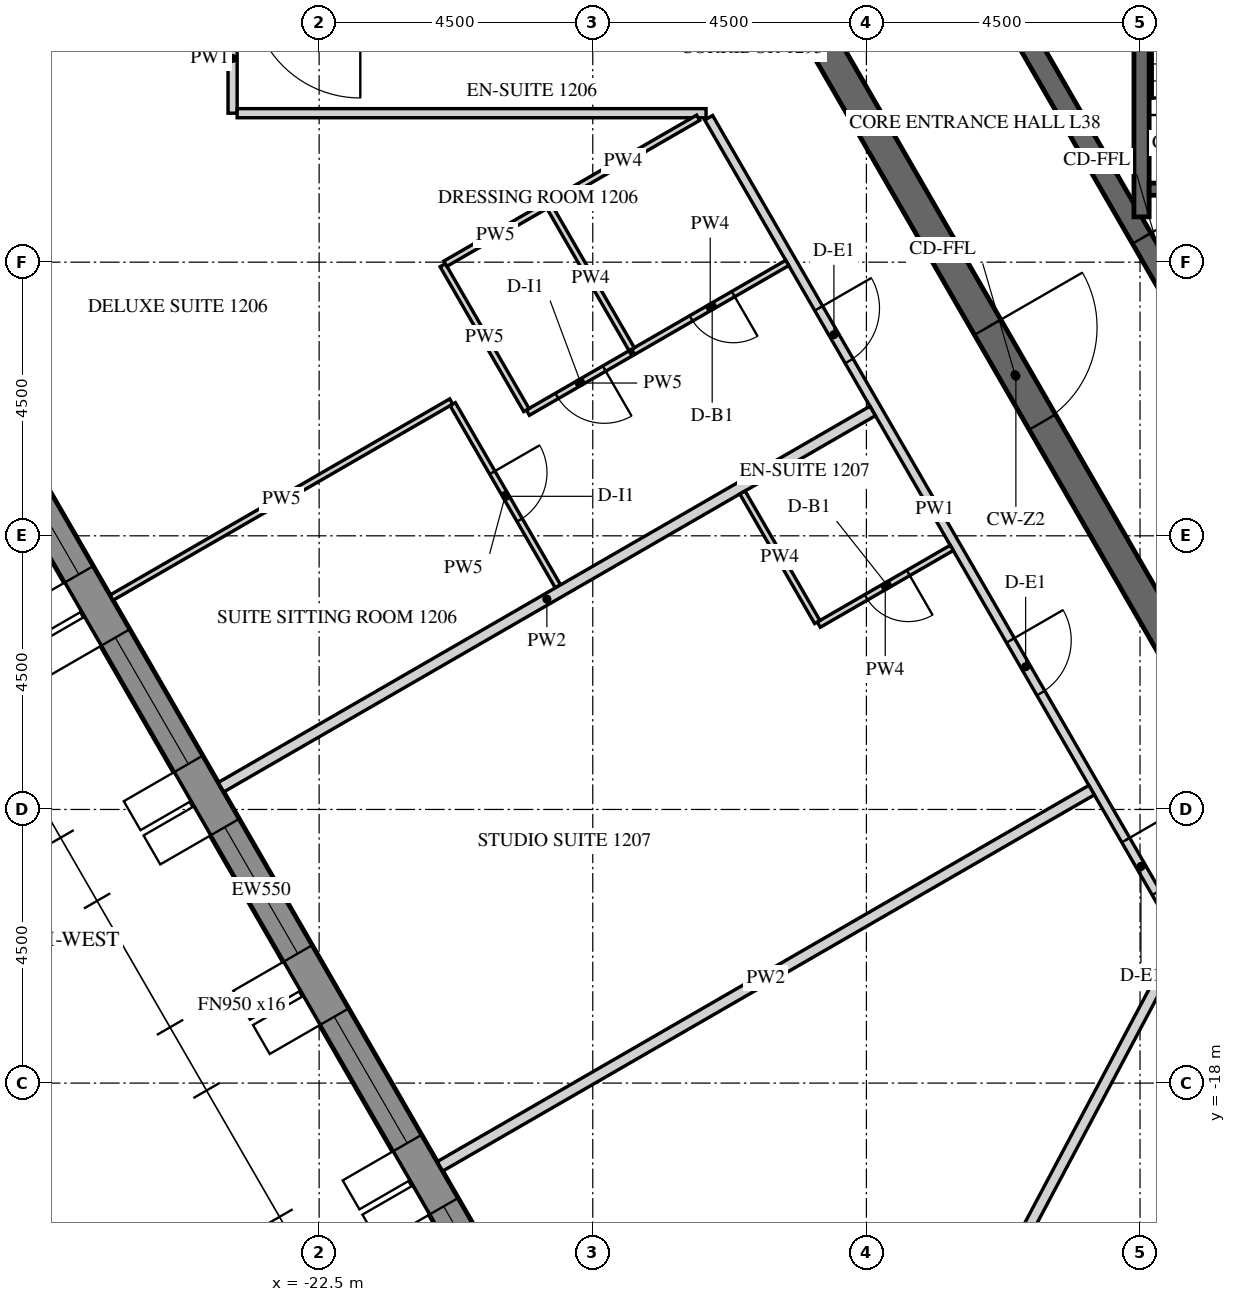
"""IFC4 building model, lengths in metres.
Left out: names, types, materials, properties, quantities, classifications, styles, units other than length and angle.
Written with IfcOpenShell. Run it as: python <this file> out.ifc"""

import sys

from ifc_helpers import new_model, si_unit, direction, frame, frame_2d, origin, place, context, subcontext, project, spatial, polyline, rectangle, outline, extrude, element, fill, save


model = new_model("IFC4")
c1 = context("Model", 3, precision=1e-05, world=origin(), true_north=direction((0.0, 1.0)))
c2 = subcontext(c1, "Body", "Model", "MODEL_VIEW")
j1 = project(units=[si_unit("LENGTHUNIT", "METRE"), si_unit("PLANEANGLEUNIT", "RADIAN")], contexts=[c1])
p1 = place(None, origin())
s1 = spatial("IfcSite", under=j1, at=p1, CompositionType="ELEMENT")
p2 = place(p1, origin())
s2 = spatial("IfcBuilding", under=s1, at=p2, CompositionType="ELEMENT")
p3 = place(p2, frame((0.0, 0.0, 164.4)))
s3 = spatial("IfcBuildingStorey", under=s2, at=p3, CompositionType="ELEMENT", Elevation=164.4)
p4 = place(p3, frame((-30.391, -2.811, -0.15), z_axis=(0.0, 0.0, 1.0), x_axis=(0.499998569178, -0.866026229868, 0.0)))
e1 = element("IfcWall", 1, at=p4, inside=s3, PredefinedType="SOLIDWALL", context=c2, shape_type="SweptSolid", body=[
    extrude(outline(polyline([(-0.022, -0.275), (27.783, -0.275), (27.732, 0.275), (0.022, 0.275), (-0.022, -0.275)])), origin(), (0.0, 0.0, 1.0), 3.9),
])
p5 = place(p4, frame((1.879, 0.0, 1.05)))
e2 = element("IfcOpeningElement", 2, at=p5, cuts=e1, PredefinedType="OPENING", context=c2, shape_type="SweptSolid", body=[
    extrude(rectangle(XDim=2.4, YDim=2.4, at=frame_2d((1.2, 1.2))), frame((0.0, 0.285, 0.0), z_axis=(0.0, -1.0, 0.0), x_axis=(1.0, 0.0, 0.0)), (0.0, 0.0, 1.0), 0.57),
])
p6 = place(p4, frame((5.479, 0.0, 1.05)))
e3 = element("IfcOpeningElement", 3, at=p6, cuts=e1, PredefinedType="OPENING", context=c2, shape_type="SweptSolid", body=[
    extrude(rectangle(XDim=2.4, YDim=2.4, at=frame_2d((1.2, 1.2))), frame((0.0, 0.285, 0.0), z_axis=(0.0, -1.0, 0.0), x_axis=(1.0, 0.0, 0.0)), (0.0, 0.0, 1.0), 0.57),
])
p7 = place(p4, frame((9.079, 0.0, 1.05)))
e4 = element("IfcOpeningElement", 4, at=p7, cuts=e1, PredefinedType="OPENING", context=c2, shape_type="SweptSolid", body=[
    extrude(rectangle(XDim=2.4, YDim=2.4, at=frame_2d((1.2, 1.2))), frame((0.0, 0.285, 0.0), z_axis=(0.0, -1.0, 0.0), x_axis=(1.0, 0.0, 0.0)), (0.0, 0.0, 1.0), 0.57),
])
p8 = place(p4, frame((12.679, 0.0, 1.05)))
e5 = element("IfcOpeningElement", 5, at=p8, cuts=e1, PredefinedType="OPENING", context=c2, shape_type="SweptSolid", body=[
    extrude(rectangle(XDim=2.4, YDim=2.4, at=frame_2d((1.2, 1.2))), frame((0.0, 0.285, 0.0), z_axis=(0.0, -1.0, 0.0), x_axis=(1.0, 0.0, 0.0)), (0.0, 0.0, 1.0), 0.57),
])
p9 = place(p4, frame((16.279, 0.0, 1.05)))
e6 = element("IfcOpeningElement", 6, at=p9, cuts=e1, PredefinedType="OPENING", context=c2, shape_type="SweptSolid", body=[
    extrude(rectangle(XDim=2.4, YDim=2.4, at=frame_2d((1.2, 1.2))), frame((0.0, 0.285, 0.0), z_axis=(0.0, -1.0, 0.0), x_axis=(1.0, 0.0, 0.0)), (0.0, 0.0, 1.0), 0.57),
])
p10 = place(p4, frame((19.879, 0.0, 1.05)))
e7 = element("IfcOpeningElement", 7, at=p10, cuts=e1, PredefinedType="OPENING", context=c2, shape_type="SweptSolid", body=[
    extrude(rectangle(XDim=2.4, YDim=2.4, at=frame_2d((1.2, 1.2))), frame((0.0, 0.285, 0.0), z_axis=(0.0, -1.0, 0.0), x_axis=(1.0, 0.0, 0.0)), (0.0, 0.0, 1.0), 0.57),
])
p11 = place(p4, frame((23.479, 0.0, 1.05)))
e8 = element("IfcOpeningElement", 8, at=p11, cuts=e1, PredefinedType="OPENING", context=c2, shape_type="SweptSolid", body=[
    extrude(rectangle(XDim=2.4, YDim=2.4, at=frame_2d((1.2, 1.2))), frame((0.0, 0.285, 0.0), z_axis=(0.0, -1.0, 0.0), x_axis=(1.0, 0.0, 0.0)), (0.0, 0.0, 1.0), 0.57),
])
p12 = place(p3, frame((-14.722, 0.0, -0.15), z_axis=(0.0, 0.0, 1.0), x_axis=(0.50000571537, -0.866022103989, 0.0)))
e9 = element("IfcWall", 9, at=p12, inside=s3, PredefinedType="SHEAR", context=c2, shape_type="SweptSolid", body=[
    extrude(outline(polyline([(-0.144, -0.25), (14.867, -0.25), (14.578, 0.25), (0.144, 0.25), (-0.144, -0.25)])), origin(), (0.0, 0.0, 1.0), 3.9),
])
p13 = place(p12, frame((6.432, 0.0, 0.15)))
e10 = element("IfcOpeningElement", 10, at=p13, cuts=e9, PredefinedType="OPENING", context=c2, shape_type="SweptSolid", body=[
    extrude(rectangle(XDim=1.8, YDim=2.4, at=frame_2d((0.9, 1.2))), frame((0.0, 0.26, 0.0), z_axis=(0.0, -1.0, 0.0), x_axis=(1.0, 0.0, 0.0)), (0.0, 0.0, 1.0), 0.52),
])
p14 = place(p3, frame((-11.345, 0.0, -0.15), z_axis=(0.0, 0.0, 1.0), x_axis=(0.499995046907, -0.866028263435, 0.0)))
e11 = element("IfcWall", 11, at=p14, inside=s3, PredefinedType="SHEAR", context=c2, shape_type="SweptSolid", body=[
    extrude(outline(polyline([(-0.101, -0.175), (11.446, -0.175), (11.244, 0.175), (0.101, 0.175), (-0.101, -0.175)])), origin(), (0.0, 0.0, 1.0), 3.9),
])
p15 = place(p14, frame((4.744, 0.0, 0.15)))
e12 = element("IfcOpeningElement", 12, at=p15, cuts=e11, PredefinedType="OPENING", context=c2, shape_type="SweptSolid", body=[
    extrude(rectangle(XDim=1.8, YDim=2.4, at=frame_2d((0.9, 1.2))), frame((0.0, 0.185, 0.0), z_axis=(0.0, -1.0, 0.0), x_axis=(1.0, 0.0, 0.0)), (0.0, 0.0, 1.0), 0.37),
])
p16 = place(p3, frame((-8.975, -3.755, -0.25), z_axis=(0.0, 0.0, 1.0), x_axis=(0.0, 1.0, 0.0)))
e13 = element("IfcWall", 13, at=p16, inside=s3, PredefinedType="SHEAR", context=c2, shape_type="SweptSolid", body=[
    extrude(rectangle(XDim=7.51, YDim=0.25, at=frame_2d((3.755, 0.0))), origin(), (0.0, 0.0, 1.0), 3.9),
])
p17 = place(p3, frame((-8.85, -3.3, -0.25), z_axis=(0.0, 0.0, 1.0), x_axis=(1.0, 0.0, 0.0)))
e14 = element("IfcWall", 14, at=p17, inside=s3, PredefinedType="SHEAR", context=c2, shape_type="SweptSolid", body=[
    extrude(rectangle(XDim=2.95, YDim=0.2, at=frame_2d((1.475, 0.0))), origin(), (0.0, 0.0, 1.0), 3.9),
])
p18 = place(p17, frame((0.875, 0.0, 0.25)))
e15 = element("IfcOpeningElement", 15, at=p18, cuts=e14, PredefinedType="OPENING", context=c2, shape_type="SweptSolid", body=[
    extrude(rectangle(XDim=1.2, YDim=2.4, at=frame_2d((0.6, 1.2))), frame((0.0, 0.11, 0.0), z_axis=(0.0, -1.0, 0.0), x_axis=(1.0, 0.0, 0.0)), (0.0, 0.0, 1.0), 0.22),
])
p19 = place(p3, frame((-23.923, -0.25, 0.0), z_axis=(0.0, 0.0, 1.0), x_axis=(0.0, -1.0, 0.0)))
e16 = element("IfcWall", 16, at=p19, inside=s3, PredefinedType="PARTITIONING", context=c2, shape_type="SweptSolid", body=[
    extrude(rectangle(XDim=1.8, YDim=0.15, at=frame_2d((0.9, 0.0))), origin(), (0.0, 0.0, 1.0), 2.988),
])
p20 = place(p3, frame((-23.848, -2.05, 0.0), z_axis=(0.0, 0.0, 1.0), x_axis=(1.0, 0.0, 0.0)))
e17 = element("IfcWall", 17, at=p20, inside=s3, PredefinedType="PARTITIONING", context=c2, shape_type="SweptSolid", body=[
    extrude(rectangle(XDim=7.711, YDim=0.15, at=frame_2d((3.855, 0.0))), origin(), (0.0, 0.0, 1.0), 2.988),
])
p21 = place(p3, frame((-16.094, -2.125, 0.0), z_axis=(0.0, 0.0, 1.0), x_axis=(0.500010545262, -0.866019315389, 0.0)))
e18 = element("IfcWall", 18, at=p21, inside=s3, PredefinedType="PARTITIONING", context=c2, shape_type="SweptSolid", body=[
    extrude(rectangle(XDim=14.867, YDim=0.15, at=frame_2d((7.434, 0.0))), origin(), (0.0, 0.0, 1.0), 2.988),
])
p22 = place(p21, frame((3.619, 0.0, 0.0)))
e19 = element("IfcOpeningElement", 19, at=p22, cuts=e18, PredefinedType="OPENING", context=c2, shape_type="SweptSolid", body=[
    extrude(rectangle(XDim=1.0, YDim=2.1, at=frame_2d((0.5, 1.05))), frame((0.0, 0.085, 0.0), z_axis=(0.0, -1.0, 0.0), x_axis=(1.0, 0.0, 0.0)), (0.0, 0.0, 1.0), 0.17),
])
p23 = place(p21, frame((9.924, 0.0, 0.0)))
e20 = element("IfcOpeningElement", 20, at=p23, cuts=e18, PredefinedType="OPENING", context=c2, shape_type="SweptSolid", body=[
    extrude(rectangle(XDim=1.0, YDim=2.1, at=frame_2d((0.5, 1.05))), frame((0.0, 0.085, 0.0), z_axis=(0.0, -1.0, 0.0), x_axis=(1.0, 0.0, 0.0)), (0.0, 0.0, 1.0), 0.17),
])
p24 = place(p21, frame((13.717, 0.0, 0.0)))
e21 = element("IfcOpeningElement", 21, at=p24, cuts=e18, PredefinedType="OPENING", context=c2, shape_type="SweptSolid", body=[
    extrude(rectangle(XDim=1.0, YDim=2.1, at=frame_2d((0.5, 1.05))), frame((0.0, 0.085, 0.0), z_axis=(0.0, -1.0, 0.0), x_axis=(1.0, 0.0, 0.0)), (0.0, 0.0, 1.0), 0.17),
])
p25 = place(p3, frame((-18.735, -3.55, 0.0), z_axis=(0.0, 0.0, 1.0), x_axis=(0.866025820012, 0.499999279071, 0.0)))
e22 = element("IfcWall", 22, at=p25, inside=s3, PredefinedType="PARTITIONING", context=c2, shape_type="SweptSolid", body=[
    extrude(rectangle(XDim=2.85, YDim=0.1, at=frame_2d((1.425, 0.0))), origin(), (0.0, 0.0, 1.0), 2.988),
])
p26 = place(p3, frame((-14.802, -4.512, 0.0), z_axis=(0.0, 0.0, 1.0), x_axis=(-0.866025730634, -0.499999433879, 0.0)))
e23 = element("IfcWall", 23, at=p26, inside=s3, PredefinedType="PARTITIONING", context=c2, shape_type="SweptSolid", body=[
    extrude(rectangle(XDim=2.925, YDim=0.1, at=frame_2d((1.462, 0.0))), origin(), (0.0, 0.0, 1.0), 2.988),
])
p27 = place(p26, frame((1.025, 0.0, 0.0)))
e24 = element("IfcOpeningElement", 24, at=p27, cuts=e23, PredefinedType="OPENING", context=c2, shape_type="SweptSolid", body=[
    extrude(rectangle(XDim=0.8, YDim=2.1, at=frame_2d((0.4, 1.05))), frame((0.0, 0.06, 0.0), z_axis=(0.0, -1.0, 0.0), x_axis=(1.0, 0.0, 0.0)), (0.0, 0.0, 1.0), 0.12),
])
p28 = place(p3, frame((-17.378, -6.0, 0.0), z_axis=(0.0, 0.0, 1.0), x_axis=(-0.866000020948, -0.500043961785, 0.0)))
e25 = element("IfcWall", 25, at=p28, inside=s3, PredefinedType="PARTITIONING", context=c2, shape_type="SweptSolid", body=[
    extrude(rectangle(XDim=1.95, YDim=0.1, at=frame_2d((0.975, 0.0))), origin(), (0.0, 0.0, 1.0), 2.988),
])
p29 = place(p28, frame((0.5, 0.0, 0.0)))
e26 = element("IfcOpeningElement", 26, at=p29, cuts=e25, PredefinedType="OPENING", context=c2, shape_type="SweptSolid", body=[
    extrude(rectangle(XDim=0.9, YDim=2.1, at=frame_2d((0.45, 1.05))), frame((0.0, 0.06, 0.0), z_axis=(0.0, -1.0, 0.0), x_axis=(1.0, 0.0, 0.0)), (0.0, 0.0, 1.0), 0.12),
])
p30 = place(p3, frame((-19.092, -6.932, 0.0), z_axis=(0.0, 0.0, 1.0), x_axis=(-0.499996545922, 0.866027397988, 0.0)))
e27 = element("IfcWall", 27, at=p30, inside=s3, PredefinedType="PARTITIONING", context=c2, shape_type="SweptSolid", body=[
    extrude(rectangle(XDim=2.75, YDim=0.1, at=frame_2d((1.375, 0.0))), origin(), (0.0, 0.0, 1.0), 2.988),
])
p31 = place(p3, frame((-20.424, -4.525, 0.0), z_axis=(0.0, 0.0, 1.0), x_axis=(0.866044365799, 0.499967155389, 0.0)))
e28 = element("IfcWall", 28, at=p31, inside=s3, PredefinedType="PARTITIONING", context=c2, shape_type="SweptSolid", body=[
    extrude(rectangle(XDim=1.9, YDim=0.1, at=frame_2d((0.95, 0.0))), origin(), (0.0, 0.0, 1.0), 2.988),
])
p32 = place(p3, frame((-25.914, -10.017, 0.0), z_axis=(0.0, 0.0, 1.0), x_axis=(0.866021702275, 0.500006411147, 0.0)))
e29 = element("IfcWall", 29, at=p32, inside=s3, PredefinedType="PARTITIONING", context=c2, shape_type="SweptSolid", body=[
    extrude(rectangle(XDim=6.45, YDim=0.1, at=frame_2d((3.225, 0.0))), origin(), (0.0, 0.0, 1.0), 2.988),
])
p33 = place(p3, frame((-20.302, -6.835, 0.0), z_axis=(0.0, 0.0, 1.0), x_axis=(0.500009533716, -0.866019899421, 0.0)))
e30 = element("IfcWall", 30, at=p33, inside=s3, PredefinedType="PARTITIONING", context=c2, shape_type="SweptSolid", body=[
    extrude(rectangle(XDim=3.46, YDim=0.1, at=frame_2d((1.73, 0.0))), origin(), (0.0, 0.0, 1.0), 2.988),
])
p34 = place(p33, frame((1.3, 0.0, 0.0)))
e31 = element("IfcOpeningElement", 31, at=p34, cuts=e30, PredefinedType="OPENING", context=c2, shape_type="SweptSolid", body=[
    extrude(rectangle(XDim=0.9, YDim=2.1, at=frame_2d((0.45, 1.05))), frame((0.0, 0.06, 0.0), z_axis=(0.0, -1.0, 0.0), x_axis=(1.0, 0.0, 0.0)), (0.0, 0.0, 1.0), 0.12),
])
p35 = place(p3, frame((-24.114, -13.134, 0.0), z_axis=(0.0, 0.0, 1.0), x_axis=(0.866024931941, 0.500000817256, 0.0)))
e32 = element("IfcWall", 32, at=p35, inside=s3, PredefinedType="PARTITIONING", context=c2, shape_type="SweptSolid", body=[
    extrude(rectangle(XDim=12.375, YDim=0.18, at=frame_2d((6.188, 0.0))), origin(), (0.0, 0.0, 1.0), 2.988),
])
p36 = place(p3, frame((-18.71, -3.593, 0.0), z_axis=(0.0, 0.0, 1.0), x_axis=(0.4999416173, -0.866059108428, 0.0)))
e33 = element("IfcWall", 33, at=p36, inside=s3, PredefinedType="PARTITIONING", context=c2, shape_type="SweptSolid", body=[
    extrude(rectangle(XDim=2.7, YDim=0.1, at=frame_2d((1.35, 0.0))), origin(), (0.0, 0.0, 1.0), 2.988),
])
p37 = place(p3, frame((-12.096, -9.198, 0.0), z_axis=(0.0, 0.0, 1.0), x_axis=(-0.866039067339, -0.499976333282, 0.0)))
e34 = element("IfcWall", 34, at=p37, inside=s3, PredefinedType="PARTITIONING", context=c2, shape_type="SweptSolid", body=[
    extrude(rectangle(XDim=2.525, YDim=0.1, at=frame_2d((1.262, 0.0))), origin(), (0.0, 0.0, 1.0), 2.988),
])
p38 = place(p37, frame((0.825, 0.0, 0.0)))
e35 = element("IfcOpeningElement", 35, at=p38, cuts=e34, PredefinedType="OPENING", context=c2, shape_type="SweptSolid", body=[
    extrude(rectangle(XDim=0.8, YDim=2.1, at=frame_2d((0.4, 1.05))), frame((0.0, 0.06, 0.0), z_axis=(0.0, -1.0, 0.0), x_axis=(1.0, 0.0, 0.0)), (0.0, 0.0, 1.0), 0.12),
])
p39 = place(p3, frame((-14.308, -10.418, 0.0), z_axis=(0.0, 0.0, 1.0), x_axis=(-0.499960120811, 0.86604842682, 0.0)))
e36 = element("IfcWall", 36, at=p39, inside=s3, PredefinedType="PARTITIONING", context=c2, shape_type="SweptSolid", body=[
    extrude(rectangle(XDim=2.46, YDim=0.1, at=frame_2d((1.23, 0.0))), origin(), (0.0, 0.0, 1.0), 2.988),
])
p40 = place(p3, frame((-20.513, -19.37, 0.0), z_axis=(0.0, 0.0, 1.0), x_axis=(0.866024931941, 0.500000817256, 0.0)))
e37 = element("IfcWall", 37, at=p40, inside=s3, PredefinedType="PARTITIONING", context=c2, shape_type="SweptSolid", body=[
    extrude(rectangle(XDim=12.375, YDim=0.18, at=frame_2d((6.188, 0.0))), origin(), (0.0, 0.0, 1.0), 2.988),
])
p41 = place(p3, frame((-14.876, -27.977, 0.0), z_axis=(0.0, 0.0, 1.0), x_axis=(0.469468328163, 0.882949312731, 0.0)))
e38 = element("IfcWall", 38, at=p41, inside=s3, PredefinedType="PARTITIONING", context=c2, shape_type="SweptSolid", body=[
    extrude(rectangle(XDim=14.613, YDim=0.18, at=frame_2d((7.306, 0.0))), origin(), (0.0, 0.0, 1.0), 2.988),
])
p42 = place(p6, frame((0.0, 0.205, 0.0)))
e39 = element("IfcWindow", 39, at=p42, inside=s3, PartitioningType="DOUBLE_PANEL_VERTICAL", PredefinedType="WINDOW", context=c2, shape_type="SweptSolid", body=[
    extrude(rectangle(XDim=2.4, YDim=2.4, at=frame_2d((1.2, 1.2))), frame((0.0, 0.03, 0.0), z_axis=(0.0, -1.0, 0.0), x_axis=(1.0, 0.0, 0.0)), (0.0, 0.0, 1.0), 0.06),
])
fill(e3, e39)
p43 = place(p7, frame((0.0, 0.205, 0.0)))
e40 = element("IfcWindow", 40, at=p43, inside=s3, PartitioningType="DOUBLE_PANEL_VERTICAL", PredefinedType="WINDOW", context=c2, shape_type="SweptSolid", body=[
    extrude(rectangle(XDim=2.4, YDim=2.4, at=frame_2d((1.2, 1.2))), frame((0.0, 0.03, 0.0), z_axis=(0.0, -1.0, 0.0), x_axis=(1.0, 0.0, 0.0)), (0.0, 0.0, 1.0), 0.06),
])
fill(e4, e40)
p44 = place(p8, frame((0.0, 0.205, 0.0)))
e41 = element("IfcWindow", 41, at=p44, inside=s3, PartitioningType="DOUBLE_PANEL_VERTICAL", PredefinedType="WINDOW", context=c2, shape_type="SweptSolid", body=[
    extrude(rectangle(XDim=2.4, YDim=2.4, at=frame_2d((1.2, 1.2))), frame((0.0, 0.03, 0.0), z_axis=(0.0, -1.0, 0.0), x_axis=(1.0, 0.0, 0.0)), (0.0, 0.0, 1.0), 0.06),
])
fill(e5, e41)
p45 = place(p9, frame((0.0, 0.205, 0.0)))
e42 = element("IfcWindow", 42, at=p45, inside=s3, PartitioningType="DOUBLE_PANEL_VERTICAL", PredefinedType="WINDOW", context=c2, shape_type="SweptSolid", body=[
    extrude(rectangle(XDim=2.4, YDim=2.4, at=frame_2d((1.2, 1.2))), frame((0.0, 0.03, 0.0), z_axis=(0.0, -1.0, 0.0), x_axis=(1.0, 0.0, 0.0)), (0.0, 0.0, 1.0), 0.06),
])
fill(e6, e42)
p46 = place(p10, frame((0.0, 0.205, 0.0)))
e43 = element("IfcWindow", 43, at=p46, inside=s3, PartitioningType="DOUBLE_PANEL_VERTICAL", PredefinedType="WINDOW", context=c2, shape_type="SweptSolid", body=[
    extrude(rectangle(XDim=2.4, YDim=2.4, at=frame_2d((1.2, 1.2))), frame((0.0, 0.03, 0.0), z_axis=(0.0, -1.0, 0.0), x_axis=(1.0, 0.0, 0.0)), (0.0, 0.0, 1.0), 0.06),
])
fill(e7, e43)
p47 = place(p13, origin())
e44 = element("IfcDoor", 44, at=p47, inside=s3, OperationType="DOUBLE_DOOR_SINGLE_SWING", PredefinedType="DOOR", context=c2, shape_type="SweptSolid", body=[
    extrude(rectangle(XDim=1.8, YDim=2.4, at=frame_2d((0.9, 1.2))), frame((0.0, 0.025, 0.0), z_axis=(0.0, -1.0, 0.0), x_axis=(1.0, 0.0, 0.0)), (0.0, 0.0, 1.0), 0.05),
])
fill(e10, e44)
p48 = place(p15, origin())
e45 = element("IfcDoor", 45, at=p48, inside=s3, OperationType="DOUBLE_DOOR_SINGLE_SWING", PredefinedType="DOOR", context=c2, shape_type="SweptSolid", body=[
    extrude(rectangle(XDim=1.8, YDim=2.4, at=frame_2d((0.9, 1.2))), frame((0.0, 0.025, 0.0), z_axis=(0.0, -1.0, 0.0), x_axis=(1.0, 0.0, 0.0)), (0.0, 0.0, 1.0), 0.05),
])
fill(e12, e45)
p49 = place(p22, origin())
e46 = element("IfcDoor", 46, at=p49, inside=s3, OperationType="SINGLE_SWING_RIGHT", PredefinedType="DOOR", context=c2, shape_type="SweptSolid", body=[
    extrude(rectangle(XDim=1.0, YDim=2.1, at=frame_2d((0.5, 1.05))), frame((0.0, 0.025, 0.0), z_axis=(0.0, -1.0, 0.0), x_axis=(1.0, 0.0, 0.0)), (0.0, 0.0, 1.0), 0.05),
])
fill(e19, e46)
p50 = place(p27, origin())
e47 = element("IfcDoor", 47, at=p50, inside=s3, OperationType="SINGLE_SWING_RIGHT", PredefinedType="DOOR", context=c2, shape_type="SweptSolid", body=[
    extrude(rectangle(XDim=0.8, YDim=2.1, at=frame_2d((0.4, 1.05))), frame((0.0, 0.025, 0.0), z_axis=(0.0, -1.0, 0.0), x_axis=(1.0, 0.0, 0.0)), (0.0, 0.0, 1.0), 0.05),
])
fill(e24, e47)
p51 = place(p29, origin())
e48 = element("IfcDoor", 48, at=p51, inside=s3, OperationType="SINGLE_SWING_RIGHT", PredefinedType="DOOR", context=c2, shape_type="SweptSolid", body=[
    extrude(rectangle(XDim=0.9, YDim=2.1, at=frame_2d((0.45, 1.05))), frame((0.0, 0.025, 0.0), z_axis=(0.0, -1.0, 0.0), x_axis=(1.0, 0.0, 0.0)), (0.0, 0.0, 1.0), 0.05),
])
fill(e26, e48)
p52 = place(p34, origin())
e49 = element("IfcDoor", 49, at=p52, inside=s3, OperationType="SINGLE_SWING_RIGHT", PredefinedType="DOOR", context=c2, shape_type="SweptSolid", body=[
    extrude(rectangle(XDim=0.9, YDim=2.1, at=frame_2d((0.45, 1.05))), frame((0.0, 0.025, 0.0), z_axis=(0.0, -1.0, 0.0), x_axis=(1.0, 0.0, 0.0)), (0.0, 0.0, 1.0), 0.05),
])
fill(e31, e49)
p53 = place(p23, origin())
e50 = element("IfcDoor", 50, at=p53, inside=s3, OperationType="SINGLE_SWING_RIGHT", PredefinedType="DOOR", context=c2, shape_type="SweptSolid", body=[
    extrude(rectangle(XDim=1.0, YDim=2.1, at=frame_2d((0.5, 1.05))), frame((0.0, 0.025, 0.0), z_axis=(0.0, -1.0, 0.0), x_axis=(1.0, 0.0, 0.0)), (0.0, 0.0, 1.0), 0.05),
])
fill(e20, e50)
p54 = place(p38, origin())
e51 = element("IfcDoor", 51, at=p54, inside=s3, OperationType="SINGLE_SWING_RIGHT", PredefinedType="DOOR", context=c2, shape_type="SweptSolid", body=[
    extrude(rectangle(XDim=0.8, YDim=2.1, at=frame_2d((0.4, 1.05))), frame((0.0, 0.025, 0.0), z_axis=(0.0, -1.0, 0.0), x_axis=(1.0, 0.0, 0.0)), (0.0, 0.0, 1.0), 0.05),
])
fill(e35, e51)
p55 = place(p24, origin())
e52 = element("IfcDoor", 52, at=p55, inside=s3, OperationType="SINGLE_SWING_LEFT", PredefinedType="DOOR", context=c2, shape_type="SweptSolid", body=[
    extrude(rectangle(XDim=1.0, YDim=2.1, at=frame_2d((0.5, 1.05))), frame((0.0, 0.025, 0.0), z_axis=(0.0, -1.0, 0.0), x_axis=(1.0, 0.0, 0.0)), (0.0, 0.0, 1.0), 0.05),
])
fill(e21, e52)
save(model, sys.argv[1])
